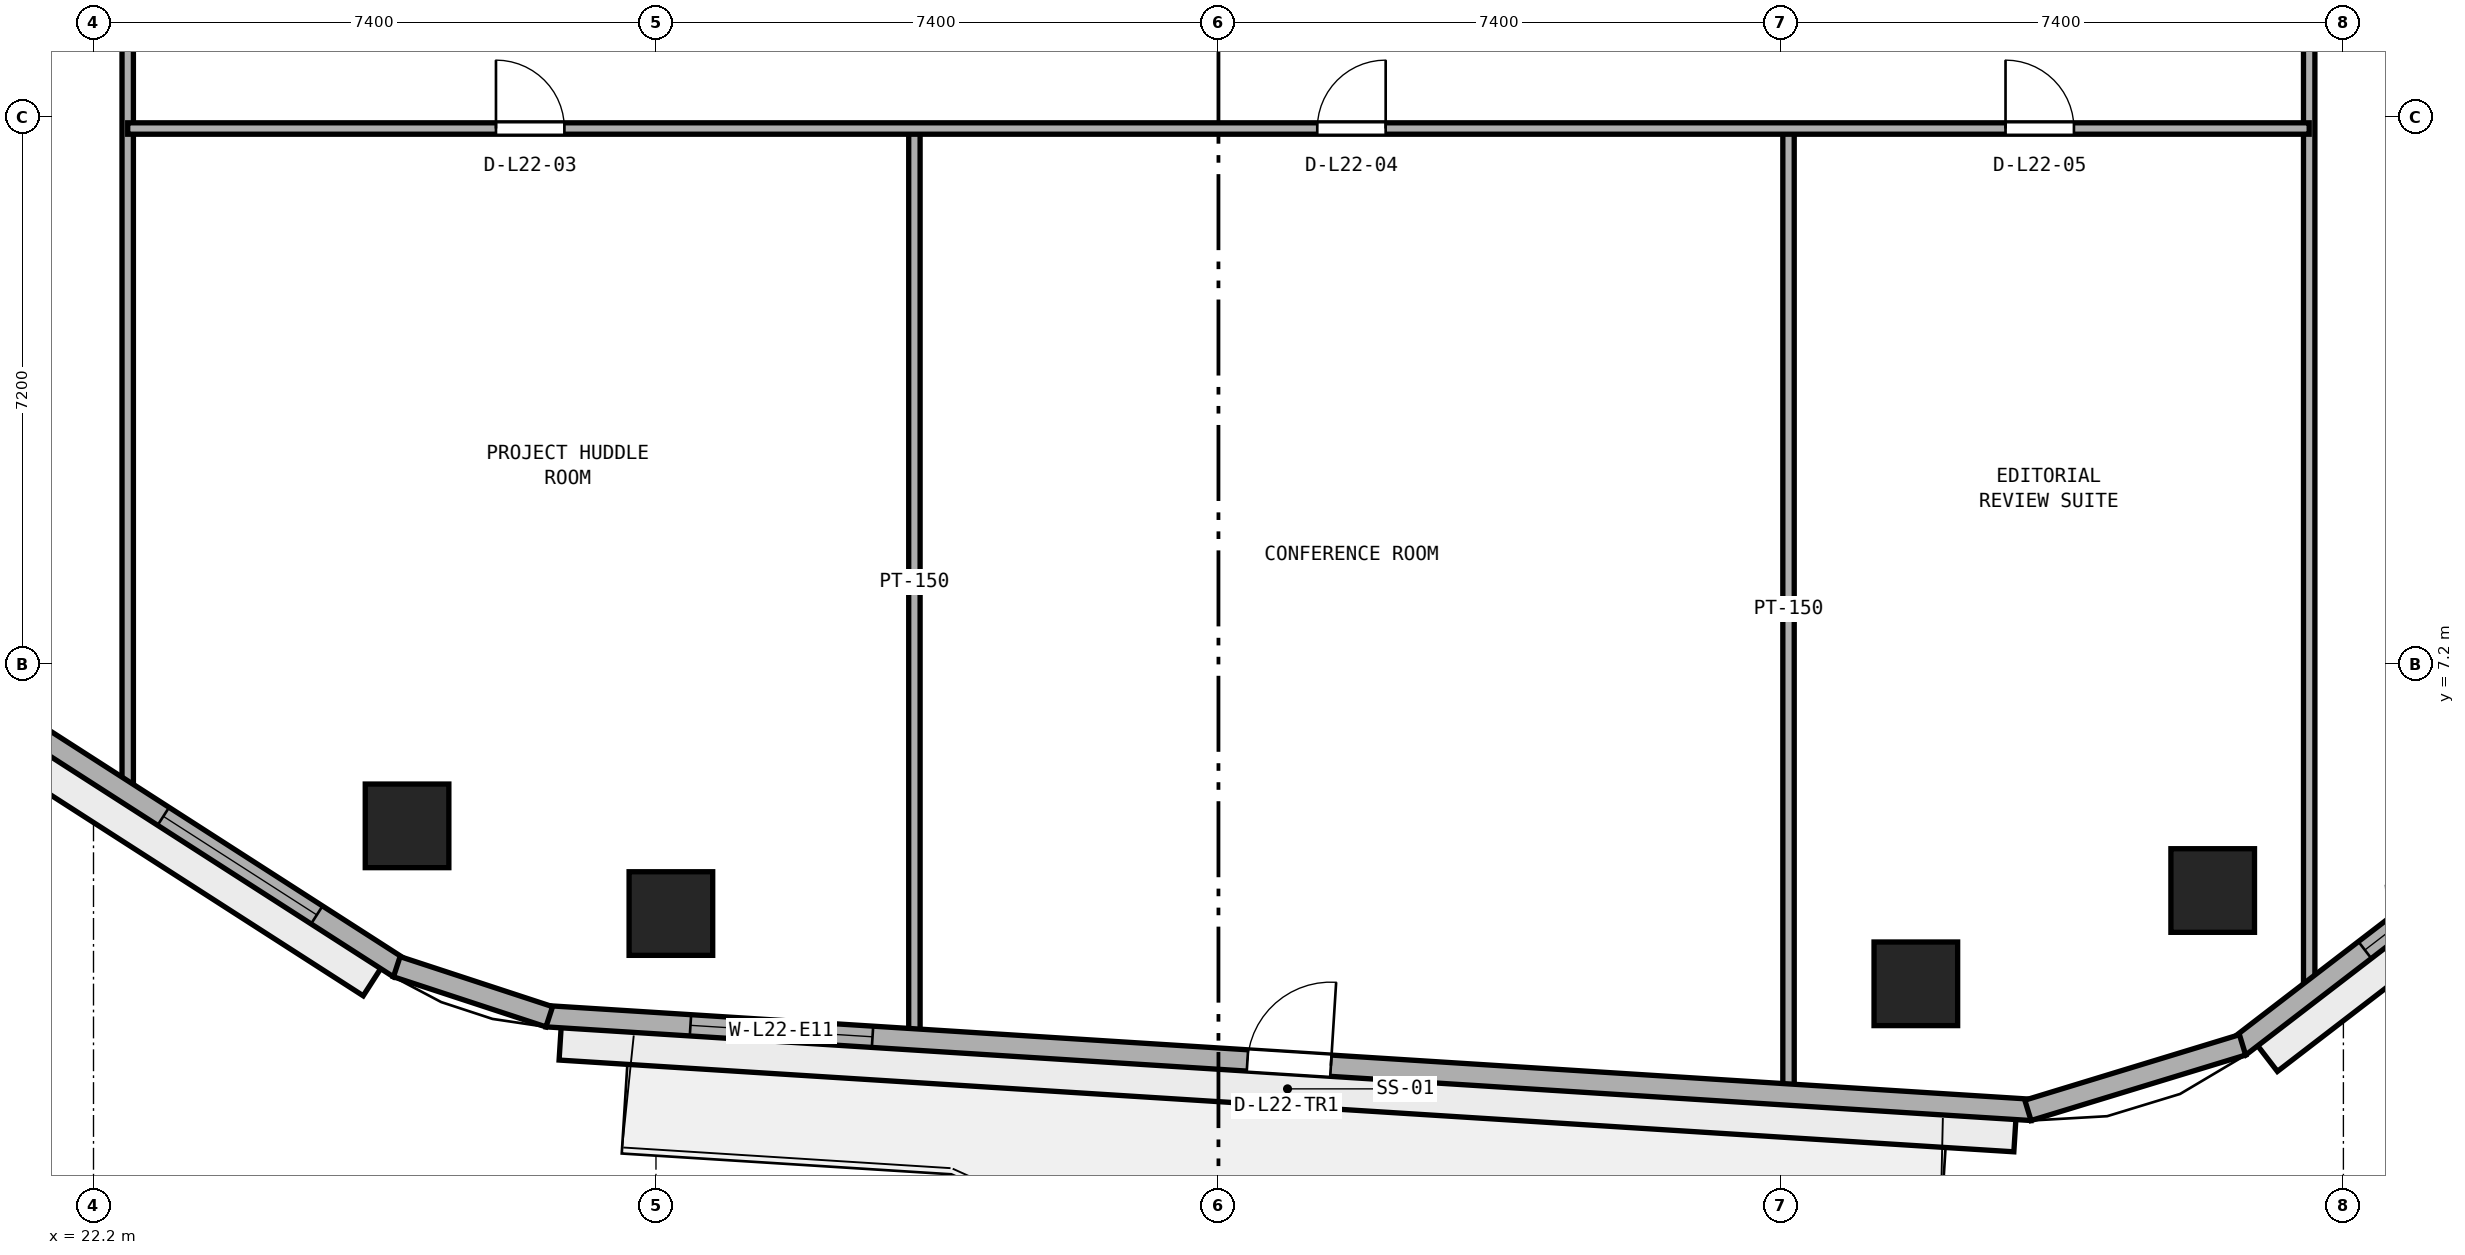
"""IFC4 building model, lengths in metres.
Left out: names, types, materials, properties, quantities, classifications, styles, units other than length and angle.
Written with IfcOpenShell. Run it as: python <this file> out.ifc"""

import sys

from ifc_helpers import new_model, si_unit, direction, frame, frame_2d, origin, origin_2d, place, context, subcontext, project, spatial, rectangle, extrude, element, fill, save


model = new_model("IFC4")
c1 = context("Model", 3, precision=1e-05, world=origin(), true_north=direction((0.0, 1.0)))
c2 = subcontext(c1, "Body", "Model", "MODEL_VIEW")
j1 = project(units=[si_unit("LENGTHUNIT", "METRE"), si_unit("PLANEANGLEUNIT", "RADIAN")], contexts=[c1])
p1 = place(None, origin())
s1 = spatial("IfcSite", under=j1, at=p1, CompositionType="ELEMENT")
p2 = place(p1, origin())
s2 = spatial("IfcBuilding", under=s1, at=p2, CompositionType="ELEMENT")
p3 = place(p2, frame((0.0, 0.0, 89.6)))
s3 = spatial("IfcBuildingStorey", under=s2, at=p3, CompositionType="ELEMENT", Elevation=89.6)
for number, where, z_axis, x_axis in (
    (1, (29.796, 3.922, 0.0), (0.0, 0.0, 1.0), (1.0, 0.0, 0.0)),
    (2, (46.175, 2.998, 0.0), (0.0, 0.0, 1.0), (1.0, 0.0, 0.0)),
    (3, (50.081, 4.225, 0.0), (0.0, 0.0, 1.0), (1.0, 0.0, 0.0)),
    (4, (26.325, 5.076, 0.0), (0.0, 0.0, 1.0), (1.0, 0.0, 0.0)),
):
    element("IfcColumn", number, at=place(p3, frame(where, z_axis=z_axis, x_axis=x_axis)), inside=s3, PredefinedType="COLUMN", context=c2, shape_type="SweptSolid", body=[
        extrude(rectangle(XDim=1.1, YDim=1.1, at=origin_2d()), origin(), (0.0, 0.0, 1.0), 3.8),
    ])
p4 = place(p3, frame((51.35, 2.843, 0.0), z_axis=(0.0, 0.0, 1.0), x_axis=(0.0, 1.0, 0.0)))
e5 = element("IfcWall", 5, at=p4, inside=s3, PredefinedType="PARTITIONING", context=c2, shape_type="SweptSolid", body=[
    extrude(rectangle(XDim=44.892, YDim=0.15, at=frame_2d((22.446, 0.0))), origin(), (0.0, 0.0, 1.0), 3.525),
])
p5 = place(p4, frame((21.907, 0.0, 0.0)))
e6 = element("IfcOpeningElement", 6, at=p5, cuts=e5, PredefinedType="OPENING", context=c2, shape_type="SweptSolid", body=[
    extrude(rectangle(XDim=0.9, YDim=2.1, at=frame_2d((0.45, 1.05))), frame((0.0, 0.085, 0.0), z_axis=(0.0, -1.0, 0.0), x_axis=(1.0, 0.0, 0.0)), (0.0, 0.0, 1.0), 0.17),
])
p6 = place(p3, frame((44.5, 1.605, 0.0), z_axis=(0.0, 0.0, 1.0), x_axis=(0.0, 1.0, 0.0)))
e7 = element("IfcWall", 7, at=p6, inside=s3, PredefinedType="PARTITIONING", context=c2, shape_type="SweptSolid", body=[
    extrude(rectangle(XDim=12.645, YDim=0.15, at=frame_2d((6.322, 0.0))), origin(), (0.0, 0.0, 1.0), 3.525),
])
p7 = place(p3, frame((33.0, 2.331, 0.0), z_axis=(0.0, 0.0, 1.0), x_axis=(0.0, 1.0, 0.0)))
e8 = element("IfcWall", 8, at=p7, inside=s3, PredefinedType="PARTITIONING", context=c2, shape_type="SweptSolid", body=[
    extrude(rectangle(XDim=11.919, YDim=0.15, at=frame_2d((5.959, 0.0))), origin(), (0.0, 0.0, 1.0), 3.525),
])
p8 = place(p3, frame((22.65, 5.476, 0.0), z_axis=(0.0, 0.0, 1.0), x_axis=(0.0, 1.0, 0.0)))
e9 = element("IfcWall", 9, at=p8, inside=s3, PredefinedType="PARTITIONING", context=c2, shape_type="SweptSolid", body=[
    extrude(rectangle(XDim=39.221, YDim=0.15, at=frame_2d((19.61, 0.0))), origin(), (0.0, 0.0, 1.0), 3.525),
])
p9 = place(p8, frame((11.199, 0.0, 0.0)))
e10 = element("IfcOpeningElement", 10, at=p9, cuts=e9, PredefinedType="OPENING", context=c2, shape_type="SweptSolid", body=[
    extrude(rectangle(XDim=0.9, YDim=2.1, at=frame_2d((0.45, 1.05))), frame((0.0, 0.085, 0.0), z_axis=(0.0, -1.0, 0.0), x_axis=(1.0, 0.0, 0.0)), (0.0, 0.0, 1.0), 0.17),
])
p10 = place(p8, frame((17.824, 0.0, 0.0)))
e11 = element("IfcOpeningElement", 11, at=p10, cuts=e9, PredefinedType="OPENING", context=c2, shape_type="SweptSolid", body=[
    extrude(rectangle(XDim=0.9, YDim=2.1, at=frame_2d((0.45, 1.05))), frame((0.0, 0.085, 0.0), z_axis=(0.0, -1.0, 0.0), x_axis=(1.0, 0.0, 0.0)), (0.0, 0.0, 1.0), 0.17),
])
p11 = place(p8, frame((25.899, 0.0, 0.0)))
e12 = element("IfcOpeningElement", 12, at=p11, cuts=e9, PredefinedType="OPENING", context=c2, shape_type="SweptSolid", body=[
    extrude(rectangle(XDim=0.9, YDim=2.1, at=frame_2d((0.45, 1.05))), frame((0.0, 0.085, 0.0), z_axis=(0.0, -1.0, 0.0), x_axis=(1.0, 0.0, 0.0)), (0.0, 0.0, 1.0), 0.17),
])
p12 = place(p3, frame((22.65, 14.25, 0.0), z_axis=(0.0, 0.0, 1.0), x_axis=(1.0, 0.0, 0.0)))
e13 = element("IfcWall", 13, at=p12, inside=s3, PredefinedType="PARTITIONING", context=c2, shape_type="SweptSolid", body=[
    extrude(rectangle(XDim=28.7, YDim=0.15, at=frame_2d((14.35, 0.0))), origin(), (0.0, 0.0, 1.0), 3.525),
])
p13 = place(p12, frame((4.845, 0.0, 0.0)))
e14 = element("IfcOpeningElement", 14, at=p13, cuts=e13, PredefinedType="OPENING", context=c2, shape_type="SweptSolid", body=[
    extrude(rectangle(XDim=0.9, YDim=2.1, at=frame_2d((0.45, 1.05))), frame((0.0, 0.085, 0.0), z_axis=(0.0, -1.0, 0.0), x_axis=(1.0, 0.0, 0.0)), (0.0, 0.0, 1.0), 0.17),
])
p14 = place(p12, frame((15.65, 0.0, 0.0)))
e15 = element("IfcOpeningElement", 15, at=p14, cuts=e13, PredefinedType="OPENING", context=c2, shape_type="SweptSolid", body=[
    extrude(rectangle(XDim=0.9, YDim=2.1, at=frame_2d((0.45, 1.05))), frame((0.0, 0.085, 0.0), z_axis=(0.0, -1.0, 0.0), x_axis=(1.0, 0.0, 0.0)), (0.0, 0.0, 1.0), 0.17),
])
p15 = place(p12, frame((24.705, 0.0, 0.0)))
e16 = element("IfcOpeningElement", 16, at=p15, cuts=e13, PredefinedType="OPENING", context=c2, shape_type="SweptSolid", body=[
    extrude(rectangle(XDim=0.9, YDim=2.1, at=frame_2d((0.45, 1.05))), frame((0.0, 0.085, 0.0), z_axis=(0.0, -1.0, 0.0), x_axis=(1.0, 0.0, 0.0)), (0.0, 0.0, 1.0), 0.17),
])
p16 = place(p3, frame((28.161, 2.571, 0.0), z_axis=(0.0, 0.0, 1.0), x_axis=(0.998017288298, -0.06294038654, 0.0)))
e17 = element("IfcWall", 17, at=p16, inside=s3, PredefinedType="STANDARD", context=c2, shape_type="SweptSolid", body=[
    extrude(rectangle(XDim=19.577, YDim=0.28, at=frame_2d((9.789, 0.0))), origin(), (0.0, 0.0, 1.0), 3.525),
])
p17 = place(p16, frame((9.239, 0.0, 0.0)))
e18 = element("IfcOpeningElement", 18, at=p17, cuts=e17, PredefinedType="OPENING", context=c2, shape_type="SweptSolid", body=[
    extrude(rectangle(XDim=1.1, YDim=2.2, at=frame_2d((0.55, 1.1))), frame((0.0, 0.15, 0.0), z_axis=(0.0, -1.0, 0.0), x_axis=(1.0, 0.0, 0.0)), (0.0, 0.0, 1.0), 0.3),
])
p18 = place(p16, frame((1.896, 0.0, 0.9)))
e19 = element("IfcOpeningElement", 19, at=p18, cuts=e17, PredefinedType="OPENING", context=c2, shape_type="SweptSolid", body=[
    extrude(rectangle(XDim=2.4, YDim=1.75, at=frame_2d((1.2, 0.875))), frame((0.0, 0.15, 0.0), z_axis=(0.0, -1.0, 0.0), x_axis=(1.0, 0.0, 0.0)), (0.0, 0.0, 1.0), 0.3),
])
p19 = place(p3, frame((50.429, 2.172, 0.0), z_axis=(0.0, 0.0, 1.0), x_axis=(0.792937466367, 0.609303023488, 0.0)))
e20 = element("IfcWall", 20, at=p19, inside=s3, PredefinedType="STANDARD", context=c2, shape_type="SweptSolid", body=[
    extrude(rectangle(XDim=17.713, YDim=0.28, at=frame_2d((8.856, 0.0))), origin(), (0.0, 0.0, 1.0), 3.525),
])
p20 = place(p19, frame((2.085, 0.0, 0.9)))
e21 = element("IfcOpeningElement", 21, at=p20, cuts=e20, PredefinedType="OPENING", context=c2, shape_type="SweptSolid", body=[
    extrude(rectangle(XDim=2.4, YDim=1.75, at=frame_2d((1.2, 0.875))), frame((0.0, 0.15, 0.0), z_axis=(0.0, -1.0, 0.0), x_axis=(1.0, 0.0, 0.0)), (0.0, 0.0, 1.0), 0.3),
])
p21 = place(p19, frame((7.656, 0.0, 0.9)))
e22 = element("IfcOpeningElement", 22, at=p21, cuts=e20, PredefinedType="OPENING", context=c2, shape_type="SweptSolid", body=[
    extrude(rectangle(XDim=2.4, YDim=1.75, at=frame_2d((1.2, 0.875))), frame((0.0, 0.15, 0.0), z_axis=(0.0, -1.0, 0.0), x_axis=(1.0, 0.0, 0.0)), (0.0, 0.0, 1.0), 0.3),
])
p22 = place(p19, frame((13.227, 0.0, 0.9)))
e23 = element("IfcOpeningElement", 23, at=p22, cuts=e20, PredefinedType="OPENING", context=c2, shape_type="SweptSolid", body=[
    extrude(rectangle(XDim=2.4, YDim=1.75, at=frame_2d((1.2, 0.875))), frame((0.0, 0.15, 0.0), z_axis=(0.0, -1.0, 0.0), x_axis=(1.0, 0.0, 0.0)), (0.0, 0.0, 1.0), 0.3),
])
p23 = place(p3, frame((11.405, 12.728, 0.0), z_axis=(0.0, 0.0, 1.0), x_axis=(0.841304564637, -0.540561402175, 0.0)))
e24 = element("IfcWall", 24, at=p23, inside=s3, PredefinedType="STANDARD", context=c2, shape_type="SweptSolid", body=[
    extrude(rectangle(XDim=17.612, YDim=0.28, at=frame_2d((8.806, 0.0))), origin(), (0.0, 0.0, 1.0), 3.525),
])
p24 = place(p23, frame((2.069, 0.0, 0.9)))
e25 = element("IfcOpeningElement", 25, at=p24, cuts=e24, PredefinedType="OPENING", context=c2, shape_type="SweptSolid", body=[
    extrude(rectangle(XDim=2.4, YDim=1.75, at=frame_2d((1.2, 0.875))), frame((0.0, 0.15, 0.0), z_axis=(0.0, -1.0, 0.0), x_axis=(1.0, 0.0, 0.0)), (0.0, 0.0, 1.0), 0.3),
])
p25 = place(p23, frame((7.606, 0.0, 0.9)))
e26 = element("IfcOpeningElement", 26, at=p25, cuts=e24, PredefinedType="OPENING", context=c2, shape_type="SweptSolid", body=[
    extrude(rectangle(XDim=2.4, YDim=1.75, at=frame_2d((1.2, 0.875))), frame((0.0, 0.15, 0.0), z_axis=(0.0, -1.0, 0.0), x_axis=(1.0, 0.0, 0.0)), (0.0, 0.0, 1.0), 0.3),
])
p26 = place(p23, frame((13.923, 0.0, 0.9)))
e27 = element("IfcOpeningElement", 27, at=p26, cuts=e24, PredefinedType="OPENING", context=c2, shape_type="SweptSolid", body=[
    extrude(rectangle(XDim=2.4, YDim=1.75, at=frame_2d((1.2, 0.875))), frame((0.0, 0.15, 0.0), z_axis=(0.0, -1.0, 0.0), x_axis=(1.0, 0.0, 0.0)), (0.0, 0.0, 1.0), 0.3),
])
p27 = place(p3, frame((47.65, 1.333, 0.0), z_axis=(0.0, 0.0, 1.0), x_axis=(0.956461287977, 0.291859220516, 0.0)))
e28 = element("IfcWall", 28, at=p27, inside=s3, PredefinedType="STANDARD", context=c2, shape_type="SweptSolid", body=[
    extrude(rectangle(XDim=2.952, YDim=0.28, at=frame_2d((1.476, 0.0))), origin(), (0.0, 0.0, 1.0), 3.525),
])
p28 = place(p3, frame((26.19, 3.223, 0.0), z_axis=(0.0, 0.0, 1.0), x_axis=(0.95016442175, -0.311749212734, 0.0)))
e29 = element("IfcWall", 29, at=p28, inside=s3, PredefinedType="STANDARD", context=c2, shape_type="SweptSolid", body=[
    extrude(rectangle(XDim=2.111, YDim=0.28, at=frame_2d((1.056, 0.0))), origin(), (0.0, 0.0, 1.0), 3.525),
])
p29 = place(p13, origin())
e30 = element("IfcDoor", 30, at=p29, inside=s3, OperationType="SINGLE_SWING_LEFT", PredefinedType="DOOR", context=c2, shape_type="SweptSolid", body=[
    extrude(rectangle(XDim=0.9, YDim=2.1, at=frame_2d((0.45, 1.05))), frame((0.0, 0.025, 0.0), z_axis=(0.0, -1.0, 0.0), x_axis=(1.0, 0.0, 0.0)), (0.0, 0.0, 1.0), 0.05),
])
fill(e14, e30)
p30 = place(p14, origin())
e31 = element("IfcDoor", 31, at=p30, inside=s3, OperationType="SINGLE_SWING_RIGHT", PredefinedType="DOOR", context=c2, shape_type="SweptSolid", body=[
    extrude(rectangle(XDim=0.9, YDim=2.1, at=frame_2d((0.45, 1.05))), frame((0.0, 0.025, 0.0), z_axis=(0.0, -1.0, 0.0), x_axis=(1.0, 0.0, 0.0)), (0.0, 0.0, 1.0), 0.05),
])
fill(e15, e31)
p31 = place(p15, origin())
e32 = element("IfcDoor", 32, at=p31, inside=s3, OperationType="SINGLE_SWING_LEFT", PredefinedType="DOOR", context=c2, shape_type="SweptSolid", body=[
    extrude(rectangle(XDim=0.9, YDim=2.1, at=frame_2d((0.45, 1.05))), frame((0.0, 0.025, 0.0), z_axis=(0.0, -1.0, 0.0), x_axis=(1.0, 0.0, 0.0)), (0.0, 0.0, 1.0), 0.05),
])
fill(e16, e32)
p32 = place(p17, origin())
e33 = element("IfcDoor", 33, at=p32, inside=s3, OperationType="SINGLE_SWING_RIGHT", PredefinedType="DOOR", context=c2, shape_type="SweptSolid", body=[
    extrude(rectangle(XDim=1.1, YDim=2.2, at=frame_2d((0.55, 1.1))), frame((0.0, 0.025, 0.0), z_axis=(0.0, -1.0, 0.0), x_axis=(1.0, 0.0, 0.0)), (0.0, 0.0, 1.0), 0.05),
])
fill(e18, e33)
p33 = place(p18, origin())
e34 = element("IfcWindow", 34, at=p33, inside=s3, PartitioningType="SINGLE_PANEL", PredefinedType="WINDOW", context=c2, shape_type="SweptSolid", body=[
    extrude(rectangle(XDim=2.4, YDim=1.75, at=frame_2d((1.2, 0.875))), frame((0.0, 0.03, 0.0), z_axis=(0.0, -1.0, 0.0), x_axis=(1.0, 0.0, 0.0)), (0.0, 0.0, 1.0), 0.06),
])
fill(e19, e34)
p34 = place(p20, origin())
e35 = element("IfcWindow", 35, at=p34, inside=s3, PartitioningType="SINGLE_PANEL", PredefinedType="WINDOW", context=c2, shape_type="SweptSolid", body=[
    extrude(rectangle(XDim=2.4, YDim=1.75, at=frame_2d((1.2, 0.875))), frame((0.0, 0.03, 0.0), z_axis=(0.0, -1.0, 0.0), x_axis=(1.0, 0.0, 0.0)), (0.0, 0.0, 1.0), 0.06),
])
fill(e21, e35)
p35 = place(p26, origin())
e36 = element("IfcWindow", 36, at=p35, inside=s3, PartitioningType="SINGLE_PANEL", PredefinedType="WINDOW", context=c2, shape_type="SweptSolid", body=[
    extrude(rectangle(XDim=2.4, YDim=1.75, at=frame_2d((1.2, 0.875))), frame((0.0, 0.03, 0.0), z_axis=(0.0, -1.0, 0.0), x_axis=(1.0, 0.0, 0.0)), (0.0, 0.0, 1.0), 0.06),
])
fill(e27, e36)
save(model, sys.argv[1])
